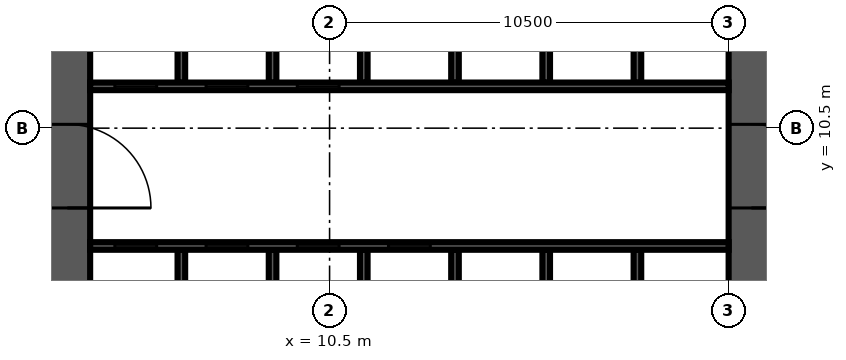
"""IFC4 building model, lengths in metres.
Left out: names, types, materials, properties, quantities, classifications, styles, units other than length and angle.
Written with IfcOpenShell. Run it as: python <this file> out.ifc"""

import sys

from ifc_helpers import new_model, si_unit, direction, frame, frame_2d, origin, place, context, subcontext, project, spatial, rectangle, extrude, source, transform, mapped, element, fill, save


model = new_model("IFC4")
c1 = context("Model", 3, precision=1e-05, world=origin(), true_north=direction((0.0, 1.0)))
c2 = subcontext(c1, "Body", "Model", "MODEL_VIEW")
j1 = project(units=[si_unit("LENGTHUNIT", "METRE"), si_unit("PLANEANGLEUNIT", "RADIAN")], contexts=[c1])
p1 = place(None, origin())
s1 = spatial("IfcSite", under=j1, at=p1, CompositionType="ELEMENT")
p2 = place(p1, origin())
s2 = spatial("IfcBuilding", under=s1, at=p2, CompositionType="ELEMENT")
p3 = place(p2, frame((0.0, 0.0, 65.7)))
s3 = spatial("IfcBuildingStorey", under=s2, at=p3, CompositionType="ELEMENT", Elevation=65.7)
m1 = source(origin(), c2, "Body", "SweptSolid", [
    extrude(rectangle(XDim=18.0, YDim=1.2, at=frame_2d((9.0, 0.0))), origin(), (0.0, 0.0, 1.0), 4.2),
])
p4 = place(p3, frame((3.6, 4.2, 0.0), z_axis=(0.0, 0.0, 1.0), x_axis=(0.0, 1.0, 0.0)))
e1 = element("IfcWall", 1, at=p4, inside=s3, PredefinedType="SHEAR", context=c2, shape_type="MappedRepresentation", body=[
    mapped(m1, transform((0.0, 0.0, 0.0), scale=1.0)),
])
m2 = source(origin(), c2, "Body", "SweptSolid", [
    extrude(rectangle(XDim=2.2, YDim=2.1, at=frame_2d((1.1, 1.05))), frame((0.0, 0.61, 0.0), z_axis=(0.0, -1.0, 0.0), x_axis=(1.0, 0.0, 0.0)), (0.0, 0.0, 1.0), 1.22),
])
p5 = place(p4, frame((4.2, 0.0, 0.0)))
e2 = element("IfcOpeningElement", 2, at=p5, cuts=e1, PredefinedType="OPENING", context=c2, shape_type="MappedRepresentation", body=[
    mapped(m2, transform((0.0, 0.0, 0.0), scale=1.0)),
])
m3 = source(origin(), c2, "Body", "SweptSolid", [
    extrude(rectangle(XDim=16.8, YDim=1.2, at=frame_2d((8.4, 0.0))), origin(), (0.0, 0.0, 1.0), 4.2),
])
p6 = place(p3, frame((21.6, 4.2, 0.0), z_axis=(0.0, 0.0, 1.0), x_axis=(0.0, 1.0, 0.0)))
e3 = element("IfcWall", 3, at=p6, inside=s3, PredefinedType="SHEAR", context=c2, shape_type="MappedRepresentation", body=[
    mapped(m3, transform((0.0, 0.0, 0.0), scale=1.0)),
])
p7 = place(p6, frame((4.2, 0.0, 0.0)))
e4 = element("IfcOpeningElement", 4, at=p7, cuts=e3, PredefinedType="OPENING", context=c2, shape_type="MappedRepresentation", body=[
    mapped(m2, transform((0.0, 0.0, 0.0), scale=1.0)),
])
m4 = source(origin(), c2, "Body", "SweptSolid", [
    extrude(rectangle(XDim=1.2, YDim=2.1, at=frame_2d((0.6, 1.05))), frame((0.0, 0.61, 0.0), z_axis=(0.0, -1.0, 0.0), x_axis=(1.0, 0.0, 0.0)), (0.0, 0.0, 1.0), 1.22),
])
p8 = place(p6, frame((14.7, 0.0, 0.0)))
e5 = element("IfcOpeningElement", 5, at=p8, cuts=e3, PredefinedType="OPENING", context=c2, shape_type="MappedRepresentation", body=[
    mapped(m4, transform((0.0, 0.0, 0.0), scale=1.0)),
])
m5 = source(origin(), c2, "Body", "SweptSolid", [
    extrude(rectangle(XDim=3.1, YDim=0.2, at=frame_2d((1.55, 0.0))), origin(), (0.0, 0.0, 1.0), 4.2),
])
for number, where, z_axis, x_axis in (
    (6, (6.6, 4.2, 0.0), (0.0, 0.0, 1.0), (0.0, 1.0, 0.0)),
    (7, (9.0, 4.2, 0.0), (0.0, 0.0, 1.0), (0.0, 1.0, 0.0)),
    (8, (11.4, 4.2, 0.0), (0.0, 0.0, 1.0), (0.0, 1.0, 0.0)),
    (9, (13.8, 4.2, 0.0), (0.0, 0.0, 1.0), (0.0, 1.0, 0.0)),
    (10, (16.2, 4.2, 0.0), (0.0, 0.0, 1.0), (0.0, 1.0, 0.0)),
    (11, (18.6, 4.2, 0.0), (0.0, 0.0, 1.0), (0.0, 1.0, 0.0)),
):
    element("IfcWall", number, at=place(p3, frame(where, z_axis=z_axis, x_axis=x_axis)), inside=s3, PredefinedType="SOLIDWALL", context=c2, shape_type="MappedRepresentation", body=[
        mapped(m5, transform((0.0, 0.0, 0.0), scale=1.0)),
    ])
m6 = source(origin(), c2, "Body", "SweptSolid", [
    extrude(rectangle(XDim=3.0, YDim=0.2, at=frame_2d((1.5, 0.0))), origin(), (0.0, 0.0, 1.0), 4.2),
])
for number, where, z_axis, x_axis in (
    (12, (6.6, 11.7, 0.0), (0.0, 0.0, 1.0), (0.0, 1.0, 0.0)),
    (13, (9.0, 11.7, 0.0), (0.0, 0.0, 1.0), (0.0, 1.0, 0.0)),
    (14, (11.4, 11.7, 0.0), (0.0, 0.0, 1.0), (0.0, 1.0, 0.0)),
    (15, (13.8, 11.7, 0.0), (0.0, 0.0, 1.0), (0.0, 1.0, 0.0)),
    (16, (16.2, 11.7, 0.0), (0.0, 0.0, 1.0), (0.0, 1.0, 0.0)),
    (17, (18.6, 11.7, 0.0), (0.0, 0.0, 1.0), (0.0, 1.0, 0.0)),
):
    element("IfcWall", number, at=place(p3, frame(where, z_axis=z_axis, x_axis=x_axis)), inside=s3, PredefinedType="SOLIDWALL", context=c2, shape_type="MappedRepresentation", body=[
        mapped(m6, transform((0.0, 0.0, 0.0), scale=1.0)),
    ])
m7 = source(origin(), c2, "Body", "SweptSolid", [
    extrude(rectangle(XDim=16.8, YDim=0.2, at=frame_2d((8.4, 0.0))), origin(), (0.0, 0.0, 1.0), 4.2),
])
p9 = place(p3, frame((4.2, 7.4, 0.0), z_axis=(0.0, 0.0, 1.0), x_axis=(1.0, 0.0, 0.0)))
e18 = element("IfcWall", 18, at=p9, inside=s3, PredefinedType="SOLIDWALL", context=c2, shape_type="MappedRepresentation", body=[
    mapped(m7, transform((0.0, 0.0, 0.0), scale=1.0)),
])
m8 = source(origin(), c2, "Body", "SweptSolid", [
    extrude(rectangle(XDim=1.1, YDim=2.1, at=frame_2d((0.55, 1.05))), frame((0.0, 0.11, 0.0), z_axis=(0.0, -1.0, 0.0), x_axis=(1.0, 0.0, 0.0)), (0.0, 0.0, 1.0), 0.22),
])
p10 = place(p9, frame((0.65, 0.0, 0.0)))
e19 = element("IfcOpeningElement", 19, at=p10, cuts=e18, PredefinedType="OPENING", context=c2, shape_type="MappedRepresentation", body=[
    mapped(m8, transform((0.0, 0.0, 0.0), scale=1.0)),
])
p11 = place(p9, frame((3.05, 0.0, 0.0)))
e20 = element("IfcOpeningElement", 20, at=p11, cuts=e18, PredefinedType="OPENING", context=c2, shape_type="MappedRepresentation", body=[
    mapped(m8, transform((0.0, 0.0, 0.0), scale=1.0)),
])
p12 = place(p9, frame((5.45, 0.0, 0.0)))
e21 = element("IfcOpeningElement", 21, at=p12, cuts=e18, PredefinedType="OPENING", context=c2, shape_type="MappedRepresentation", body=[
    mapped(m8, transform((0.0, 0.0, 0.0), scale=1.0)),
])
p13 = place(p9, frame((7.85, 0.0, 0.0)))
e22 = element("IfcOpeningElement", 22, at=p13, cuts=e18, PredefinedType="OPENING", context=c2, shape_type="MappedRepresentation", body=[
    mapped(m8, transform((0.0, 0.0, 0.0), scale=1.0)),
])
p14 = place(p3, frame((4.2, 11.6, 0.0), z_axis=(0.0, 0.0, 1.0), x_axis=(1.0, 0.0, 0.0)))
e23 = element("IfcWall", 23, at=p14, inside=s3, PredefinedType="SOLIDWALL", context=c2, shape_type="MappedRepresentation", body=[
    mapped(m7, transform((0.0, 0.0, 0.0), scale=1.0)),
])
p15 = place(p14, frame((0.65, 0.0, 0.0)))
e24 = element("IfcOpeningElement", 24, at=p15, cuts=e23, PredefinedType="OPENING", context=c2, shape_type="MappedRepresentation", body=[
    mapped(m8, transform((0.0, 0.0, 0.0), scale=1.0)),
])
p16 = place(p14, frame((3.05, 0.0, 0.0)))
e25 = element("IfcOpeningElement", 25, at=p16, cuts=e23, PredefinedType="OPENING", context=c2, shape_type="MappedRepresentation", body=[
    mapped(m8, transform((0.0, 0.0, 0.0), scale=1.0)),
])
p17 = place(p14, frame((5.45, 0.0, 0.0)))
e26 = element("IfcOpeningElement", 26, at=p17, cuts=e23, PredefinedType="OPENING", context=c2, shape_type="MappedRepresentation", body=[
    mapped(m8, transform((0.0, 0.0, 0.0), scale=1.0)),
])
m9 = source(origin(), c2, "Body", "SweptSolid", [
    extrude(rectangle(XDim=1.1, YDim=2.1, at=frame_2d((0.55, 1.05))), frame((0.0, 0.025, 0.0), z_axis=(0.0, -1.0, 0.0), x_axis=(1.0, 0.0, 0.0)), (0.0, 0.0, 1.0), 0.05),
])
p18 = place(p10, origin())
e27 = element("IfcDoor", 27, at=p18, inside=s3, OperationType="SLIDING_TO_LEFT", PredefinedType="DOOR", context=c2, shape_type="MappedRepresentation", body=[
    mapped(m9, transform((0.0, 0.0, 0.0), scale=1.0)),
])
fill(e19, e27)
p19 = place(p11, origin())
e28 = element("IfcDoor", 28, at=p19, inside=s3, OperationType="SLIDING_TO_LEFT", PredefinedType="DOOR", context=c2, shape_type="MappedRepresentation", body=[
    mapped(m9, transform((0.0, 0.0, 0.0), scale=1.0)),
])
fill(e20, e28)
p20 = place(p12, origin())
e29 = element("IfcDoor", 29, at=p20, inside=s3, OperationType="SLIDING_TO_LEFT", PredefinedType="DOOR", context=c2, shape_type="MappedRepresentation", body=[
    mapped(m9, transform((0.0, 0.0, 0.0), scale=1.0)),
])
fill(e21, e29)
p21 = place(p13, origin())
e30 = element("IfcDoor", 30, at=p21, inside=s3, OperationType="SLIDING_TO_LEFT", PredefinedType="DOOR", context=c2, shape_type="MappedRepresentation", body=[
    mapped(m9, transform((0.0, 0.0, 0.0), scale=1.0)),
])
fill(e22, e30)
p22 = place(p15, origin())
e31 = element("IfcDoor", 31, at=p22, inside=s3, OperationType="SLIDING_TO_LEFT", PredefinedType="DOOR", context=c2, shape_type="MappedRepresentation", body=[
    mapped(m9, transform((0.0, 0.0, 0.0), scale=1.0)),
])
fill(e24, e31)
p23 = place(p16, origin())
e32 = element("IfcDoor", 32, at=p23, inside=s3, OperationType="SLIDING_TO_LEFT", PredefinedType="DOOR", context=c2, shape_type="MappedRepresentation", body=[
    mapped(m9, transform((0.0, 0.0, 0.0), scale=1.0)),
])
fill(e25, e32)
p24 = place(p17, origin())
e33 = element("IfcDoor", 33, at=p24, inside=s3, OperationType="SLIDING_TO_LEFT", PredefinedType="DOOR", context=c2, shape_type="MappedRepresentation", body=[
    mapped(m9, transform((0.0, 0.0, 0.0), scale=1.0)),
])
fill(e26, e33)
m10 = source(origin(), c2, "Body", "SweptSolid", [
    extrude(rectangle(XDim=2.2, YDim=2.1, at=frame_2d((1.1, 1.05))), frame((0.0, 0.025, 0.0), z_axis=(0.0, -1.0, 0.0), x_axis=(1.0, 0.0, 0.0)), (0.0, 0.0, 1.0), 0.05),
])
p25 = place(p7, origin())
e34 = element("IfcDoor", 34, at=p25, inside=s3, OperationType="DOUBLE_DOOR_SINGLE_SWING", PredefinedType="DOOR", context=c2, shape_type="MappedRepresentation", body=[
    mapped(m10, transform((0.0, 0.0, 0.0), scale=1.0)),
])
fill(e4, e34)
p26 = place(p5, origin())
e35 = element("IfcDoor", 35, at=p26, inside=s3, OperationType="DOUBLE_DOOR_SINGLE_SWING", PredefinedType="DOOR", context=c2, shape_type="MappedRepresentation", body=[
    mapped(m10, transform((0.0, 0.0, 0.0), scale=1.0)),
])
fill(e2, e35)
save(model, sys.argv[1])
